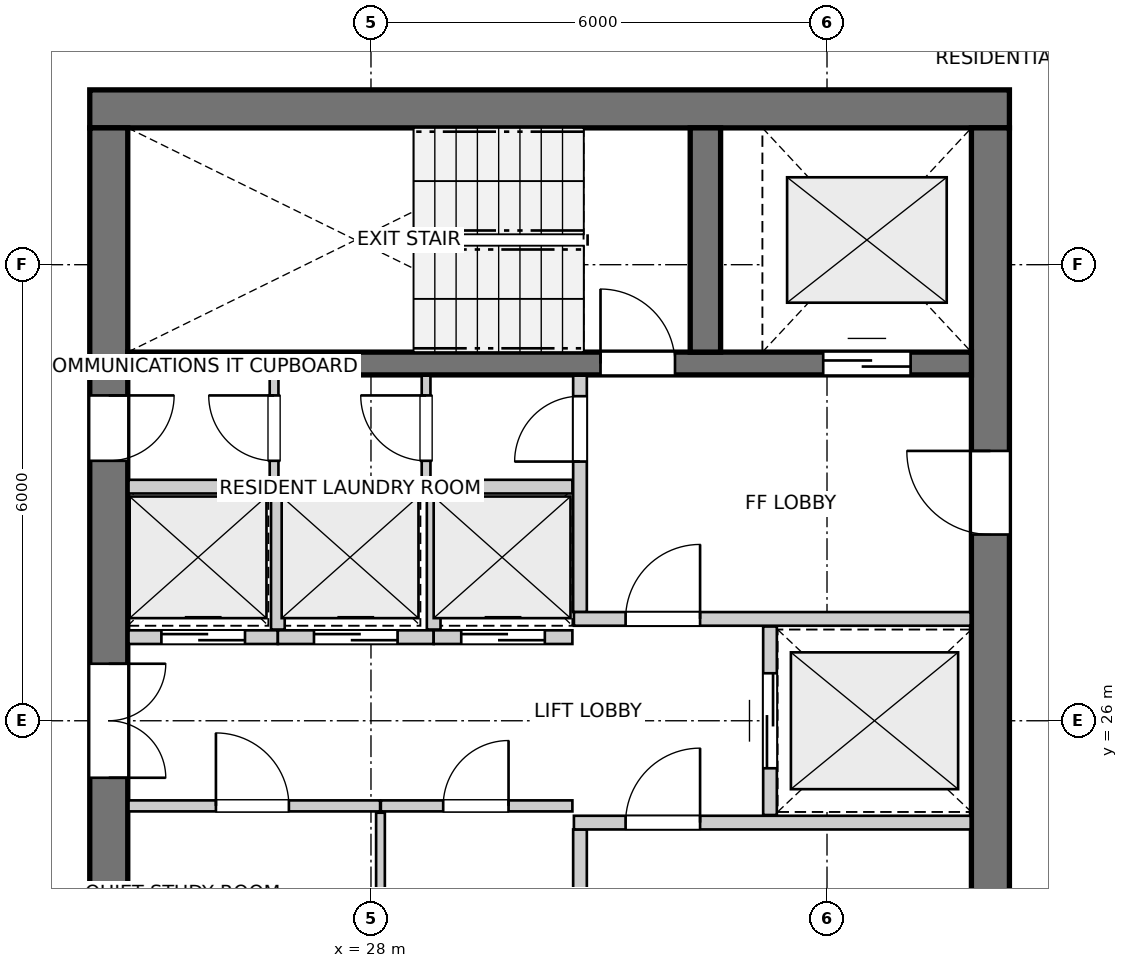
"""IFC4 building model, lengths in metres.
Left out: names, types, materials, properties, quantities, classifications, styles, units other than length and angle.
Written with IfcOpenShell. Run it as: python <this file> out.ifc"""

import sys

from ifc_helpers import new_model, si_unit, direction, frame, frame_2d, origin, place, context, subcontext, project, spatial, rectangle, extrude, source, transform, mapped, element, fill, save


model = new_model("IFC4")
c1 = context("Model", 3, precision=1e-05, world=origin(), true_north=direction((0.0, 1.0)))
c2 = subcontext(c1, "Body", "Model", "MODEL_VIEW")
j1 = project(units=[si_unit("LENGTHUNIT", "METRE"), si_unit("PLANEANGLEUNIT", "RADIAN")], contexts=[c1])
p1 = place(None, origin())
s1 = spatial("IfcSite", under=j1, at=p1, CompositionType="ELEMENT")
p2 = place(p1, origin())
s2 = spatial("IfcBuilding", under=s1, at=p2, CompositionType="ELEMENT")
p3 = place(p2, frame((0.0, 0.0, 246.8)))
s3 = spatial("IfcBuildingStorey", under=s2, at=p3, CompositionType="ELEMENT", Elevation=246.8)
p4 = place(p3, frame((36.4, 34.05, 0.0), z_axis=(0.0, 0.0, 1.0), x_axis=(-1.0, 0.0, 0.0)))
e1 = element("IfcWall", 1, at=p4, inside=s3, PredefinedType="SHEAR", context=c2, shape_type="SweptSolid", body=[
    extrude(rectangle(XDim=12.1, YDim=0.5, at=frame_2d((6.05, 0.0))), origin(), (0.0, 0.0, 1.0), 2.96),
])
p5 = place(p3, frame((24.55, 33.8, 0.0), z_axis=(0.0, 0.0, 1.0), x_axis=(0.0, -1.0, 0.0)))
e2 = element("IfcWall", 2, at=p5, inside=s3, PredefinedType="SHEAR", context=c2, shape_type="SweptSolid", body=[
    extrude(rectangle(XDim=15.6, YDim=0.5, at=frame_2d((7.8, 0.0))), origin(), (0.0, 0.0, 1.0), 2.96),
])
p6 = place(p5, frame((7.05, 0.0, 0.0)))
e3 = element("IfcOpeningElement", 3, at=p6, cuts=e2, PredefinedType="OPENING", context=c2, shape_type="SweptSolid", body=[
    extrude(rectangle(XDim=1.5, YDim=2.15, at=frame_2d((0.75, 1.075))), frame((0.0, 0.26, 0.0), z_axis=(0.0, -1.0, 0.0), x_axis=(1.0, 0.0, 0.0)), (0.0, 0.0, 1.0), 0.52),
])
p7 = place(p5, frame((3.52, 0.0, 0.0)))
e4 = element("IfcOpeningElement", 4, at=p7, cuts=e2, PredefinedType="OPENING", context=c2, shape_type="SweptSolid", body=[
    extrude(rectangle(XDim=0.86, YDim=2.05, at=frame_2d((0.43, 1.025))), frame((0.0, 0.26, 0.0), z_axis=(0.0, -1.0, 0.0), x_axis=(1.0, 0.0, 0.0)), (0.0, 0.0, 1.0), 0.52),
])
p8 = place(p5, frame((11.22, 0.0, 0.0)))
e5 = element("IfcOpeningElement", 5, at=p8, cuts=e2, PredefinedType="OPENING", context=c2, shape_type="SweptSolid", body=[
    extrude(rectangle(XDim=0.86, YDim=2.05, at=frame_2d((0.43, 1.025))), frame((0.0, 0.26, 0.0), z_axis=(0.0, -1.0, 0.0), x_axis=(1.0, 0.0, 0.0)), (0.0, 0.0, 1.0), 0.52),
])
p9 = place(p3, frame((36.15, 18.2, 0.0), z_axis=(0.0, 0.0, 1.0), x_axis=(0.0, 1.0, 0.0)))
e6 = element("IfcWall", 6, at=p9, inside=s3, PredefinedType="SHEAR", context=c2, shape_type="SweptSolid", body=[
    extrude(rectangle(XDim=15.6, YDim=0.5, at=frame_2d((7.8, 0.0))), origin(), (0.0, 0.0, 1.0), 2.96),
])
p10 = place(p9, frame((4.25, 0.0, 0.0)))
e7 = element("IfcOpeningElement", 7, at=p10, cuts=e6, PredefinedType="OPENING", context=c2, shape_type="SweptSolid", body=[
    extrude(rectangle(XDim=1.1, YDim=2.15, at=frame_2d((0.55, 1.075))), frame((0.0, 0.26, 0.0), z_axis=(0.0, -1.0, 0.0), x_axis=(1.0, 0.0, 0.0)), (0.0, 0.0, 1.0), 0.52),
])
p11 = place(p9, frame((10.25, 0.0, 0.0)))
e8 = element("IfcOpeningElement", 8, at=p11, cuts=e6, PredefinedType="OPENING", context=c2, shape_type="SweptSolid", body=[
    extrude(rectangle(XDim=1.1, YDim=2.15, at=frame_2d((0.55, 1.075))), frame((0.0, 0.26, 0.0), z_axis=(0.0, -1.0, 0.0), x_axis=(1.0, 0.0, 0.0)), (0.0, 0.0, 1.0), 0.52),
])
p12 = place(p3, frame((24.8, 30.7, 0.0), z_axis=(0.0, 0.0, 1.0), x_axis=(1.0, 0.0, 0.0)))
e9 = element("IfcWall", 9, at=p12, inside=s3, PredefinedType="SHEAR", context=c2, shape_type="SweptSolid", body=[
    extrude(rectangle(XDim=11.1, YDim=0.3, at=frame_2d((5.55, 0.0))), origin(), (0.0, 0.0, 1.0), 2.96),
])
p13 = place(p12, frame((6.22, 0.0, 0.0)))
e10 = element("IfcOpeningElement", 10, at=p13, cuts=e9, PredefinedType="OPENING", context=c2, shape_type="SweptSolid", body=[
    extrude(rectangle(XDim=0.98, YDim=2.15, at=frame_2d((0.49, 1.075))), frame((0.0, 0.16, 0.0), z_axis=(0.0, -1.0, 0.0), x_axis=(1.0, 0.0, 0.0)), (0.0, 0.0, 1.0), 0.32),
])
p14 = place(p12, frame((9.15, 0.0, 0.0)))
e11 = element("IfcOpeningElement", 11, at=p14, cuts=e9, PredefinedType="OPENING", context=c2, shape_type="SweptSolid", body=[
    extrude(rectangle(XDim=1.15, YDim=2.15, at=frame_2d((0.575, 1.075))), frame((0.0, 0.16, 0.0), z_axis=(0.0, -1.0, 0.0), x_axis=(1.0, 0.0, 0.0)), (0.0, 0.0, 1.0), 0.32),
])
p15 = place(p3, frame((32.4, 30.85, 0.0), z_axis=(0.0, 0.0, 1.0), x_axis=(0.0, 1.0, 0.0)))
e12 = element("IfcWall", 12, at=p15, inside=s3, PredefinedType="SHEAR", context=c2, shape_type="SweptSolid", body=[
    extrude(rectangle(XDim=2.95, YDim=0.4, at=frame_2d((1.475, 0.0))), origin(), (0.0, 0.0, 1.0), 2.96),
])
p16 = place(p3, frame((30.75, 21.46, 0.0), z_axis=(0.0, 0.0, 1.0), x_axis=(0.0, 1.0, 0.0)))
e13 = element("IfcWall", 13, at=p16, inside=s3, PredefinedType="PARTITIONING", context=c2, shape_type="SweptSolid", body=[
    extrude(rectangle(XDim=3.11, YDim=0.18, at=frame_2d((1.555, 0.0))), origin(), (0.0, 0.0, 1.0), 2.96),
])
p17 = place(p16, frame((0.26, 0.0, 0.0)))
e14 = element("IfcOpeningElement", 14, at=p17, cuts=e13, PredefinedType="OPENING", context=c2, shape_type="SweptSolid", body=[
    extrude(rectangle(XDim=0.86, YDim=2.05, at=frame_2d((0.43, 1.025))), frame((0.0, 0.1, 0.0), z_axis=(0.0, -1.0, 0.0), x_axis=(1.0, 0.0, 0.0)), (0.0, 0.0, 1.0), 0.2),
])
p18 = place(p3, frame((30.67, 24.66, 0.0), z_axis=(0.0, 0.0, 1.0), x_axis=(1.0, 0.0, 0.0)))
e15 = element("IfcWall", 15, at=p18, inside=s3, PredefinedType="PARTITIONING", context=c2, shape_type="SweptSolid", body=[
    extrude(rectangle(XDim=5.22, YDim=0.18, at=frame_2d((2.61, 0.0))), origin(), (0.0, 0.0, 1.0), 2.96),
])
p19 = place(p18, frame((0.68, 0.0, 0.0)))
e16 = element("IfcOpeningElement", 16, at=p19, cuts=e15, PredefinedType="OPENING", context=c2, shape_type="SweptSolid", body=[
    extrude(rectangle(XDim=0.98, YDim=2.15, at=frame_2d((0.49, 1.075))), frame((0.0, 0.1, 0.0), z_axis=(0.0, -1.0, 0.0), x_axis=(1.0, 0.0, 0.0)), (0.0, 0.0, 1.0), 0.2),
])
p20 = place(p3, frame((30.75, 27.43, 0.0), z_axis=(0.0, 0.0, 1.0), x_axis=(0.0, 1.0, 0.0)))
e17 = element("IfcWall", 17, at=p20, inside=s3, PredefinedType="PARTITIONING", context=c2, shape_type="SweptSolid", body=[
    extrude(rectangle(XDim=3.11, YDim=0.18, at=frame_2d((1.555, 0.0))), origin(), (0.0, 0.0, 1.0), 2.96),
])
p21 = place(p20, frame((1.98, 0.0, 0.0)))
e18 = element("IfcOpeningElement", 18, at=p21, cuts=e17, PredefinedType="OPENING", context=c2, shape_type="SweptSolid", body=[
    extrude(rectangle(XDim=0.86, YDim=2.05, at=frame_2d((0.43, 1.025))), frame((0.0, 0.1, 0.0), z_axis=(0.0, -1.0, 0.0), x_axis=(1.0, 0.0, 0.0)), (0.0, 0.0, 1.0), 0.2),
])
p22 = place(p3, frame((30.67, 27.34, 0.0), z_axis=(0.0, 0.0, 1.0), x_axis=(1.0, 0.0, 0.0)))
e19 = element("IfcWall", 19, at=p22, inside=s3, PredefinedType="PARTITIONING", context=c2, shape_type="SweptSolid", body=[
    extrude(rectangle(XDim=5.22, YDim=0.18, at=frame_2d((2.61, 0.0))), origin(), (0.0, 0.0, 1.0), 2.96),
])
p23 = place(p22, frame((0.68, 0.0, 0.0)))
e20 = element("IfcOpeningElement", 20, at=p23, cuts=e19, PredefinedType="OPENING", context=c2, shape_type="SweptSolid", body=[
    extrude(rectangle(XDim=0.98, YDim=2.15, at=frame_2d((0.49, 1.075))), frame((0.0, 0.1, 0.0), z_axis=(0.0, -1.0, 0.0), x_axis=(1.0, 0.0, 0.0)), (0.0, 0.0, 1.0), 0.2),
])
p24 = place(p3, frame((33.25, 24.76, 0.0), z_axis=(0.0, 0.0, 1.0), x_axis=(0.0, 1.0, 0.0)))
e21 = element("IfcWall", 21, at=p24, inside=s3, PredefinedType="PARTITIONING", context=c2, shape_type="SweptSolid", body=[
    extrude(rectangle(XDim=2.48, YDim=0.18, at=frame_2d((1.24, 0.0))), origin(), (0.0, 0.0, 1.0), 2.96),
])
p25 = place(p24, frame((0.615, 0.0, 0.0)))
e22 = element("IfcOpeningElement", 22, at=p25, cuts=e21, PredefinedType="OPENING", context=c2, shape_type="SweptSolid", body=[
    extrude(rectangle(XDim=1.25, YDim=2.15, at=frame_2d((0.625, 1.075))), frame((0.0, 0.1, 0.0), z_axis=(0.0, -1.0, 0.0), x_axis=(1.0, 0.0, 0.0)), (0.0, 0.0, 1.0), 0.2),
])
p26 = place(p3, frame((24.81, 24.88, 0.0), z_axis=(0.0, 0.0, 1.0), x_axis=(1.0, 0.0, 0.0)))
e23 = element("IfcWall", 23, at=p26, inside=s3, PredefinedType="PARTITIONING", context=c2, shape_type="SweptSolid", body=[
    extrude(rectangle(XDim=3.31, YDim=0.145, at=frame_2d((1.655, 0.0))), origin(), (0.0, 0.0, 1.0), 2.96),
])
p27 = place(p26, frame((1.15, 0.0, 0.0)))
e24 = element("IfcOpeningElement", 24, at=p27, cuts=e23, PredefinedType="OPENING", context=c2, shape_type="SweptSolid", body=[
    extrude(rectangle(XDim=0.96, YDim=2.1, at=frame_2d((0.48, 1.05))), frame((0.0, 0.083, 0.0), z_axis=(0.0, -1.0, 0.0), x_axis=(1.0, 0.0, 0.0)), (0.0, 0.0, 1.0), 0.165),
])
p28 = place(p3, frame((28.13, 24.88, 0.0), z_axis=(0.0, 0.0, 1.0), x_axis=(1.0, 0.0, 0.0)))
e25 = element("IfcWall", 25, at=p28, inside=s3, PredefinedType="PARTITIONING", context=c2, shape_type="SweptSolid", body=[
    extrude(rectangle(XDim=2.52, YDim=0.145, at=frame_2d((1.26, 0.0))), origin(), (0.0, 0.0, 1.0), 2.96),
])
p29 = place(p28, frame((0.82, 0.0, 0.0)))
e26 = element("IfcOpeningElement", 26, at=p29, cuts=e25, PredefinedType="OPENING", context=c2, shape_type="SweptSolid", body=[
    extrude(rectangle(XDim=0.86, YDim=2.05, at=frame_2d((0.43, 1.025))), frame((0.0, 0.083, 0.0), z_axis=(0.0, -1.0, 0.0), x_axis=(1.0, 0.0, 0.0)), (0.0, 0.0, 1.0), 0.165),
])
p30 = place(p3, frame((28.125, 23.02, 0.0), z_axis=(0.0, 0.0, 1.0), x_axis=(0.0, 1.0, 0.0)))
e27 = element("IfcWall", 27, at=p30, inside=s3, PredefinedType="PARTITIONING", context=c2, shape_type="SweptSolid", body=[
    extrude(rectangle(XDim=1.77, YDim=0.115, at=frame_2d((0.885, 0.0))), origin(), (0.0, 0.0, 1.0), 2.96),
])
p31 = place(p3, frame((24.81, 29.08, 0.0), z_axis=(0.0, 0.0, 1.0), x_axis=(1.0, 0.0, 0.0)))
e28 = element("IfcWall", 28, at=p31, inside=s3, PredefinedType="PARTITIONING", context=c2, shape_type="SweptSolid", body=[
    extrude(rectangle(XDim=5.84, YDim=0.18, at=frame_2d((2.92, 0.0))), origin(), (0.0, 0.0, 1.0), 2.96),
])
p32 = place(p3, frame((24.81, 27.1, 0.0), z_axis=(0.0, 0.0, 1.0), x_axis=(1.0, 0.0, 0.0)))
e29 = element("IfcWall", 29, at=p32, inside=s3, PredefinedType="PARTITIONING", context=c2, shape_type="SweptSolid", body=[
    extrude(rectangle(XDim=1.965, YDim=0.18, at=frame_2d((0.982, 0.0))), origin(), (0.0, 0.0, 1.0), 2.96),
])
p33 = place(p32, frame((0.433, 0.0, 0.0)))
e30 = element("IfcOpeningElement", 30, at=p33, cuts=e29, PredefinedType="OPENING", context=c2, shape_type="SweptSolid", body=[
    extrude(rectangle(XDim=1.1, YDim=2.15, at=frame_2d((0.55, 1.075))), frame((0.0, 0.1, 0.0), z_axis=(0.0, -1.0, 0.0), x_axis=(1.0, 0.0, 0.0)), (0.0, 0.0, 1.0), 0.2),
])
p34 = place(p3, frame((26.775, 27.1, 0.0), z_axis=(0.0, 0.0, 1.0), x_axis=(1.0, 0.0, 0.0)))
e31 = element("IfcWall", 31, at=p34, inside=s3, PredefinedType="PARTITIONING", context=c2, shape_type="SweptSolid", body=[
    extrude(rectangle(XDim=2.05, YDim=0.18, at=frame_2d((1.025, 0.0))), origin(), (0.0, 0.0, 1.0), 2.96),
])
p35 = place(p34, frame((0.475, 0.0, 0.0)))
e32 = element("IfcOpeningElement", 32, at=p35, cuts=e31, PredefinedType="OPENING", context=c2, shape_type="SweptSolid", body=[
    extrude(rectangle(XDim=1.1, YDim=2.15, at=frame_2d((0.55, 1.075))), frame((0.0, 0.1, 0.0), z_axis=(0.0, -1.0, 0.0), x_axis=(1.0, 0.0, 0.0)), (0.0, 0.0, 1.0), 0.2),
])
p36 = place(p3, frame((26.775, 27.2, 0.0), z_axis=(0.0, 0.0, 1.0), x_axis=(0.0, 1.0, 0.0)))
e33 = element("IfcWall", 33, at=p36, inside=s3, PredefinedType="PARTITIONING", context=c2, shape_type="SweptSolid", body=[
    extrude(rectangle(XDim=1.78, YDim=0.18, at=frame_2d((0.89, 0.0))), origin(), (0.0, 0.0, 1.0), 2.96),
])
p37 = place(p3, frame((28.825, 27.1, 0.0), z_axis=(0.0, 0.0, 1.0), x_axis=(1.0, 0.0, 0.0)))
e34 = element("IfcWall", 34, at=p37, inside=s3, PredefinedType="PARTITIONING", context=c2, shape_type="SweptSolid", body=[
    extrude(rectangle(XDim=1.825, YDim=0.18, at=frame_2d((0.913, 0.0))), origin(), (0.0, 0.0, 1.0), 2.96),
])
p38 = place(p37, frame((0.363, 0.0, 0.0)))
e35 = element("IfcOpeningElement", 35, at=p38, cuts=e34, PredefinedType="OPENING", context=c2, shape_type="SweptSolid", body=[
    extrude(rectangle(XDim=1.1, YDim=2.15, at=frame_2d((0.55, 1.075))), frame((0.0, 0.1, 0.0), z_axis=(0.0, -1.0, 0.0), x_axis=(1.0, 0.0, 0.0)), (0.0, 0.0, 1.0), 0.2),
])
p39 = place(p3, frame((28.825, 27.2, 0.0), z_axis=(0.0, 0.0, 1.0), x_axis=(0.0, 1.0, 0.0)))
e36 = element("IfcWall", 36, at=p39, inside=s3, PredefinedType="PARTITIONING", context=c2, shape_type="SweptSolid", body=[
    extrude(rectangle(XDim=1.78, YDim=0.18, at=frame_2d((0.89, 0.0))), origin(), (0.0, 0.0, 1.0), 2.96),
])
p40 = place(p3, frame((26.725, 29.16, 0.0), z_axis=(0.0, 0.0, 1.0), x_axis=(0.0, 1.0, 0.0)))
e37 = element("IfcWall", 37, at=p40, inside=s3, PredefinedType="PARTITIONING", context=c2, shape_type="SweptSolid", body=[
    extrude(rectangle(XDim=1.38, YDim=0.115, at=frame_2d((0.69, 0.0))), origin(), (0.0, 0.0, 1.0), 2.96),
])
p41 = place(p40, frame((0.26, 0.0, 0.0)))
e38 = element("IfcOpeningElement", 38, at=p41, cuts=e37, PredefinedType="OPENING", context=c2, shape_type="SweptSolid", body=[
    extrude(rectangle(XDim=0.86, YDim=2.05, at=frame_2d((0.43, 1.025))), frame((0.0, 0.067, 0.0), z_axis=(0.0, -1.0, 0.0), x_axis=(1.0, 0.0, 0.0)), (0.0, 0.0, 1.0), 0.135),
])
p42 = place(p3, frame((28.725, 29.16, 0.0), z_axis=(0.0, 0.0, 1.0), x_axis=(0.0, 1.0, 0.0)))
e39 = element("IfcWall", 39, at=p42, inside=s3, PredefinedType="PARTITIONING", context=c2, shape_type="SweptSolid", body=[
    extrude(rectangle(XDim=1.38, YDim=0.115, at=frame_2d((0.69, 0.0))), origin(), (0.0, 0.0, 1.0), 2.96),
])
p43 = place(p42, frame((0.26, 0.0, 0.0)))
e40 = element("IfcOpeningElement", 40, at=p43, cuts=e39, PredefinedType="OPENING", context=c2, shape_type="SweptSolid", body=[
    extrude(rectangle(XDim=0.86, YDim=2.05, at=frame_2d((0.43, 1.025))), frame((0.0, 0.067, 0.0), z_axis=(0.0, -1.0, 0.0), x_axis=(1.0, 0.0, 0.0)), (0.0, 0.0, 1.0), 0.135),
])
m1 = source(origin(), c2, "Body", "SweptSolid", [
    extrude(rectangle(XDim=0.98, YDim=2.15, at=frame_2d((0.49, 1.075))), frame((0.0, 0.025, 0.0), z_axis=(0.0, -1.0, 0.0), x_axis=(1.0, 0.0, 0.0)), (0.0, 0.0, 1.0), 0.05),
])
p44 = place(p13, origin())
e41 = element("IfcDoor", 41, at=p44, inside=s3, OperationType="SINGLE_SWING_LEFT", PredefinedType="DOOR", context=c2, shape_type="MappedRepresentation", body=[
    mapped(m1, transform((0.0, 0.0, 0.0), x_axis=(1.0, 0.0, 0.0), y_axis=(0.0, 1.0, 0.0), z_axis=(0.0, 0.0, 1.0), scale=1.0)),
])
fill(e10, e41)
m2 = source(origin(), c2, "Body", "SweptSolid", [
    extrude(rectangle(XDim=1.15, YDim=2.15, at=frame_2d((0.575, 1.075))), frame((0.0, 0.025, 0.0), z_axis=(0.0, -1.0, 0.0), x_axis=(1.0, 0.0, 0.0)), (0.0, 0.0, 1.0), 0.05),
])
p45 = place(p14, origin())
e42 = element("IfcDoor", 42, at=p45, inside=s3, OperationType="DOUBLE_DOOR_SLIDING", PredefinedType="DOOR", context=c2, shape_type="MappedRepresentation", body=[
    mapped(m2, transform((0.0, 0.0, 0.0), x_axis=(1.0, 0.0, 0.0), y_axis=(0.0, 1.0, 0.0), z_axis=(0.0, 0.0, 1.0), scale=1.0)),
])
fill(e11, e42)
m3 = source(origin(), c2, "Body", "SweptSolid", [
    extrude(rectangle(XDim=1.1, YDim=2.15, at=frame_2d((0.55, 1.075))), frame((0.0, 0.025, 0.0), z_axis=(0.0, -1.0, 0.0), x_axis=(1.0, 0.0, 0.0)), (0.0, 0.0, 1.0), 0.05),
])
p46 = place(p11, origin())
e43 = element("IfcDoor", 43, at=p46, inside=s3, OperationType="SINGLE_SWING_RIGHT", PredefinedType="DOOR", context=c2, shape_type="MappedRepresentation", body=[
    mapped(m3, transform((0.0, 0.0, 0.0), x_axis=(1.0, 0.0, 0.0), y_axis=(0.0, 1.0, 0.0), z_axis=(0.0, 0.0, 1.0), scale=1.0)),
])
fill(e8, e43)
m4 = source(origin(), c2, "Body", "SweptSolid", [
    extrude(rectangle(XDim=1.5, YDim=2.15, at=frame_2d((0.75, 1.075))), frame((0.0, 0.025, 0.0), z_axis=(0.0, -1.0, 0.0), x_axis=(1.0, 0.0, 0.0)), (0.0, 0.0, 1.0), 0.05),
])
p47 = place(p6, origin())
e44 = element("IfcDoor", 44, at=p47, inside=s3, OperationType="DOUBLE_DOOR_SINGLE_SWING", PredefinedType="DOOR", context=c2, shape_type="MappedRepresentation", body=[
    mapped(m4, transform((0.0, 0.0, 0.0), x_axis=(1.0, 0.0, 0.0), y_axis=(0.0, 1.0, 0.0), z_axis=(0.0, 0.0, 1.0), scale=1.0)),
])
fill(e3, e44)
m5 = source(origin(), c2, "Body", "SweptSolid", [
    extrude(rectangle(XDim=0.86, YDim=2.05, at=frame_2d((0.43, 1.025))), frame((0.0, 0.025, 0.0), z_axis=(0.0, -1.0, 0.0), x_axis=(1.0, 0.0, 0.0)), (0.0, 0.0, 1.0), 0.05),
])
p48 = place(p7, origin())
e45 = element("IfcDoor", 45, at=p48, inside=s3, OperationType="SINGLE_SWING_LEFT", PredefinedType="DOOR", context=c2, shape_type="MappedRepresentation", body=[
    mapped(m5, transform((0.0, 0.0, 0.0), x_axis=(1.0, 0.0, 0.0), y_axis=(0.0, 1.0, 0.0), z_axis=(0.0, 0.0, 1.0), scale=1.0)),
])
fill(e4, e45)
p49 = place(p19, origin())
e46 = element("IfcDoor", 46, at=p49, inside=s3, OperationType="SINGLE_SWING_RIGHT", PredefinedType="DOOR", context=c2, shape_type="MappedRepresentation", body=[
    mapped(m1, transform((0.0, 0.0, 0.0), x_axis=(1.0, 0.0, 0.0), y_axis=(0.0, 1.0, 0.0), z_axis=(0.0, 0.0, 1.0), scale=1.0)),
])
fill(e16, e46)
p50 = place(p21, origin())
e47 = element("IfcDoor", 47, at=p50, inside=s3, OperationType="SINGLE_SWING_LEFT", PredefinedType="DOOR", context=c2, shape_type="MappedRepresentation", body=[
    mapped(m5, transform((0.0, 0.0, 0.0), x_axis=(1.0, 0.0, 0.0), y_axis=(0.0, 1.0, 0.0), z_axis=(0.0, 0.0, 1.0), scale=1.0)),
])
fill(e18, e47)
p51 = place(p23, origin())
e48 = element("IfcDoor", 48, at=p51, inside=s3, OperationType="SINGLE_SWING_RIGHT", PredefinedType="DOOR", context=c2, shape_type="MappedRepresentation", body=[
    mapped(m1, transform((0.0, 0.0, 0.0), x_axis=(1.0, 0.0, 0.0), y_axis=(0.0, 1.0, 0.0), z_axis=(0.0, 0.0, 1.0), scale=1.0)),
])
fill(e20, e48)
m6 = source(origin(), c2, "Body", "SweptSolid", [
    extrude(rectangle(XDim=1.25, YDim=2.15, at=frame_2d((0.625, 1.075))), frame((0.0, 0.025, 0.0), z_axis=(0.0, -1.0, 0.0), x_axis=(1.0, 0.0, 0.0)), (0.0, 0.0, 1.0), 0.05),
])
p52 = place(p25, origin())
e49 = element("IfcDoor", 49, at=p52, inside=s3, OperationType="DOUBLE_DOOR_SLIDING", PredefinedType="DOOR", context=c2, shape_type="MappedRepresentation", body=[
    mapped(m6, transform((0.0, 0.0, 0.0), x_axis=(1.0, 0.0, 0.0), y_axis=(0.0, 1.0, 0.0), z_axis=(0.0, 0.0, 1.0), scale=1.0)),
])
fill(e22, e49)
m7 = source(origin(), c2, "Body", "SweptSolid", [
    extrude(rectangle(XDim=0.96, YDim=2.1, at=frame_2d((0.48, 1.05))), frame((0.0, 0.025, 0.0), z_axis=(0.0, -1.0, 0.0), x_axis=(1.0, 0.0, 0.0)), (0.0, 0.0, 1.0), 0.05),
])
p53 = place(p27, origin())
e50 = element("IfcDoor", 50, at=p53, inside=s3, OperationType="SINGLE_SWING_LEFT", PredefinedType="DOOR", context=c2, shape_type="MappedRepresentation", body=[
    mapped(m7, transform((0.0, 0.0, 0.0), x_axis=(1.0, 0.0, 0.0), y_axis=(0.0, 1.0, 0.0), z_axis=(0.0, 0.0, 1.0), scale=1.0)),
])
fill(e24, e50)
p54 = place(p29, origin())
e51 = element("IfcDoor", 51, at=p54, inside=s3, OperationType="SINGLE_SWING_RIGHT", PredefinedType="DOOR", context=c2, shape_type="MappedRepresentation", body=[
    mapped(m5, transform((0.0, 0.0, 0.0), x_axis=(1.0, 0.0, 0.0), y_axis=(0.0, 1.0, 0.0), z_axis=(0.0, 0.0, 1.0), scale=1.0)),
])
fill(e26, e51)
p55 = place(p33, origin())
e52 = element("IfcDoor", 52, at=p55, inside=s3, OperationType="DOUBLE_DOOR_SLIDING", PredefinedType="DOOR", context=c2, shape_type="MappedRepresentation", body=[
    mapped(m3, transform((0.0, 0.0, 0.0), x_axis=(1.0, 0.0, 0.0), y_axis=(0.0, 1.0, 0.0), z_axis=(0.0, 0.0, 1.0), scale=1.0)),
])
fill(e30, e52)
p56 = place(p35, origin())
e53 = element("IfcDoor", 53, at=p56, inside=s3, OperationType="DOUBLE_DOOR_SLIDING", PredefinedType="DOOR", context=c2, shape_type="MappedRepresentation", body=[
    mapped(m3, transform((0.0, 0.0, 0.0), x_axis=(1.0, 0.0, 0.0), y_axis=(0.0, 1.0, 0.0), z_axis=(0.0, 0.0, 1.0), scale=1.0)),
])
fill(e32, e53)
p57 = place(p38, origin())
e54 = element("IfcDoor", 54, at=p57, inside=s3, OperationType="DOUBLE_DOOR_SLIDING", PredefinedType="DOOR", context=c2, shape_type="MappedRepresentation", body=[
    mapped(m3, transform((0.0, 0.0, 0.0), x_axis=(1.0, 0.0, 0.0), y_axis=(0.0, 1.0, 0.0), z_axis=(0.0, 0.0, 1.0), scale=1.0)),
])
fill(e35, e54)
p58 = place(p41, origin())
e55 = element("IfcDoor", 55, at=p58, inside=s3, OperationType="SINGLE_SWING_RIGHT", PredefinedType="DOOR", context=c2, shape_type="MappedRepresentation", body=[
    mapped(m5, transform((0.0, 0.0, 0.0), x_axis=(1.0, 0.0, 0.0), y_axis=(0.0, 1.0, 0.0), z_axis=(0.0, 0.0, 1.0), scale=1.0)),
])
fill(e38, e55)
p59 = place(p43, origin())
e56 = element("IfcDoor", 56, at=p59, inside=s3, OperationType="SINGLE_SWING_RIGHT", PredefinedType="DOOR", context=c2, shape_type="MappedRepresentation", body=[
    mapped(m5, transform((0.0, 0.0, 0.0), x_axis=(1.0, 0.0, 0.0), y_axis=(0.0, 1.0, 0.0), z_axis=(0.0, 0.0, 1.0), scale=1.0)),
])
fill(e40, e56)
save(model, sys.argv[1])
